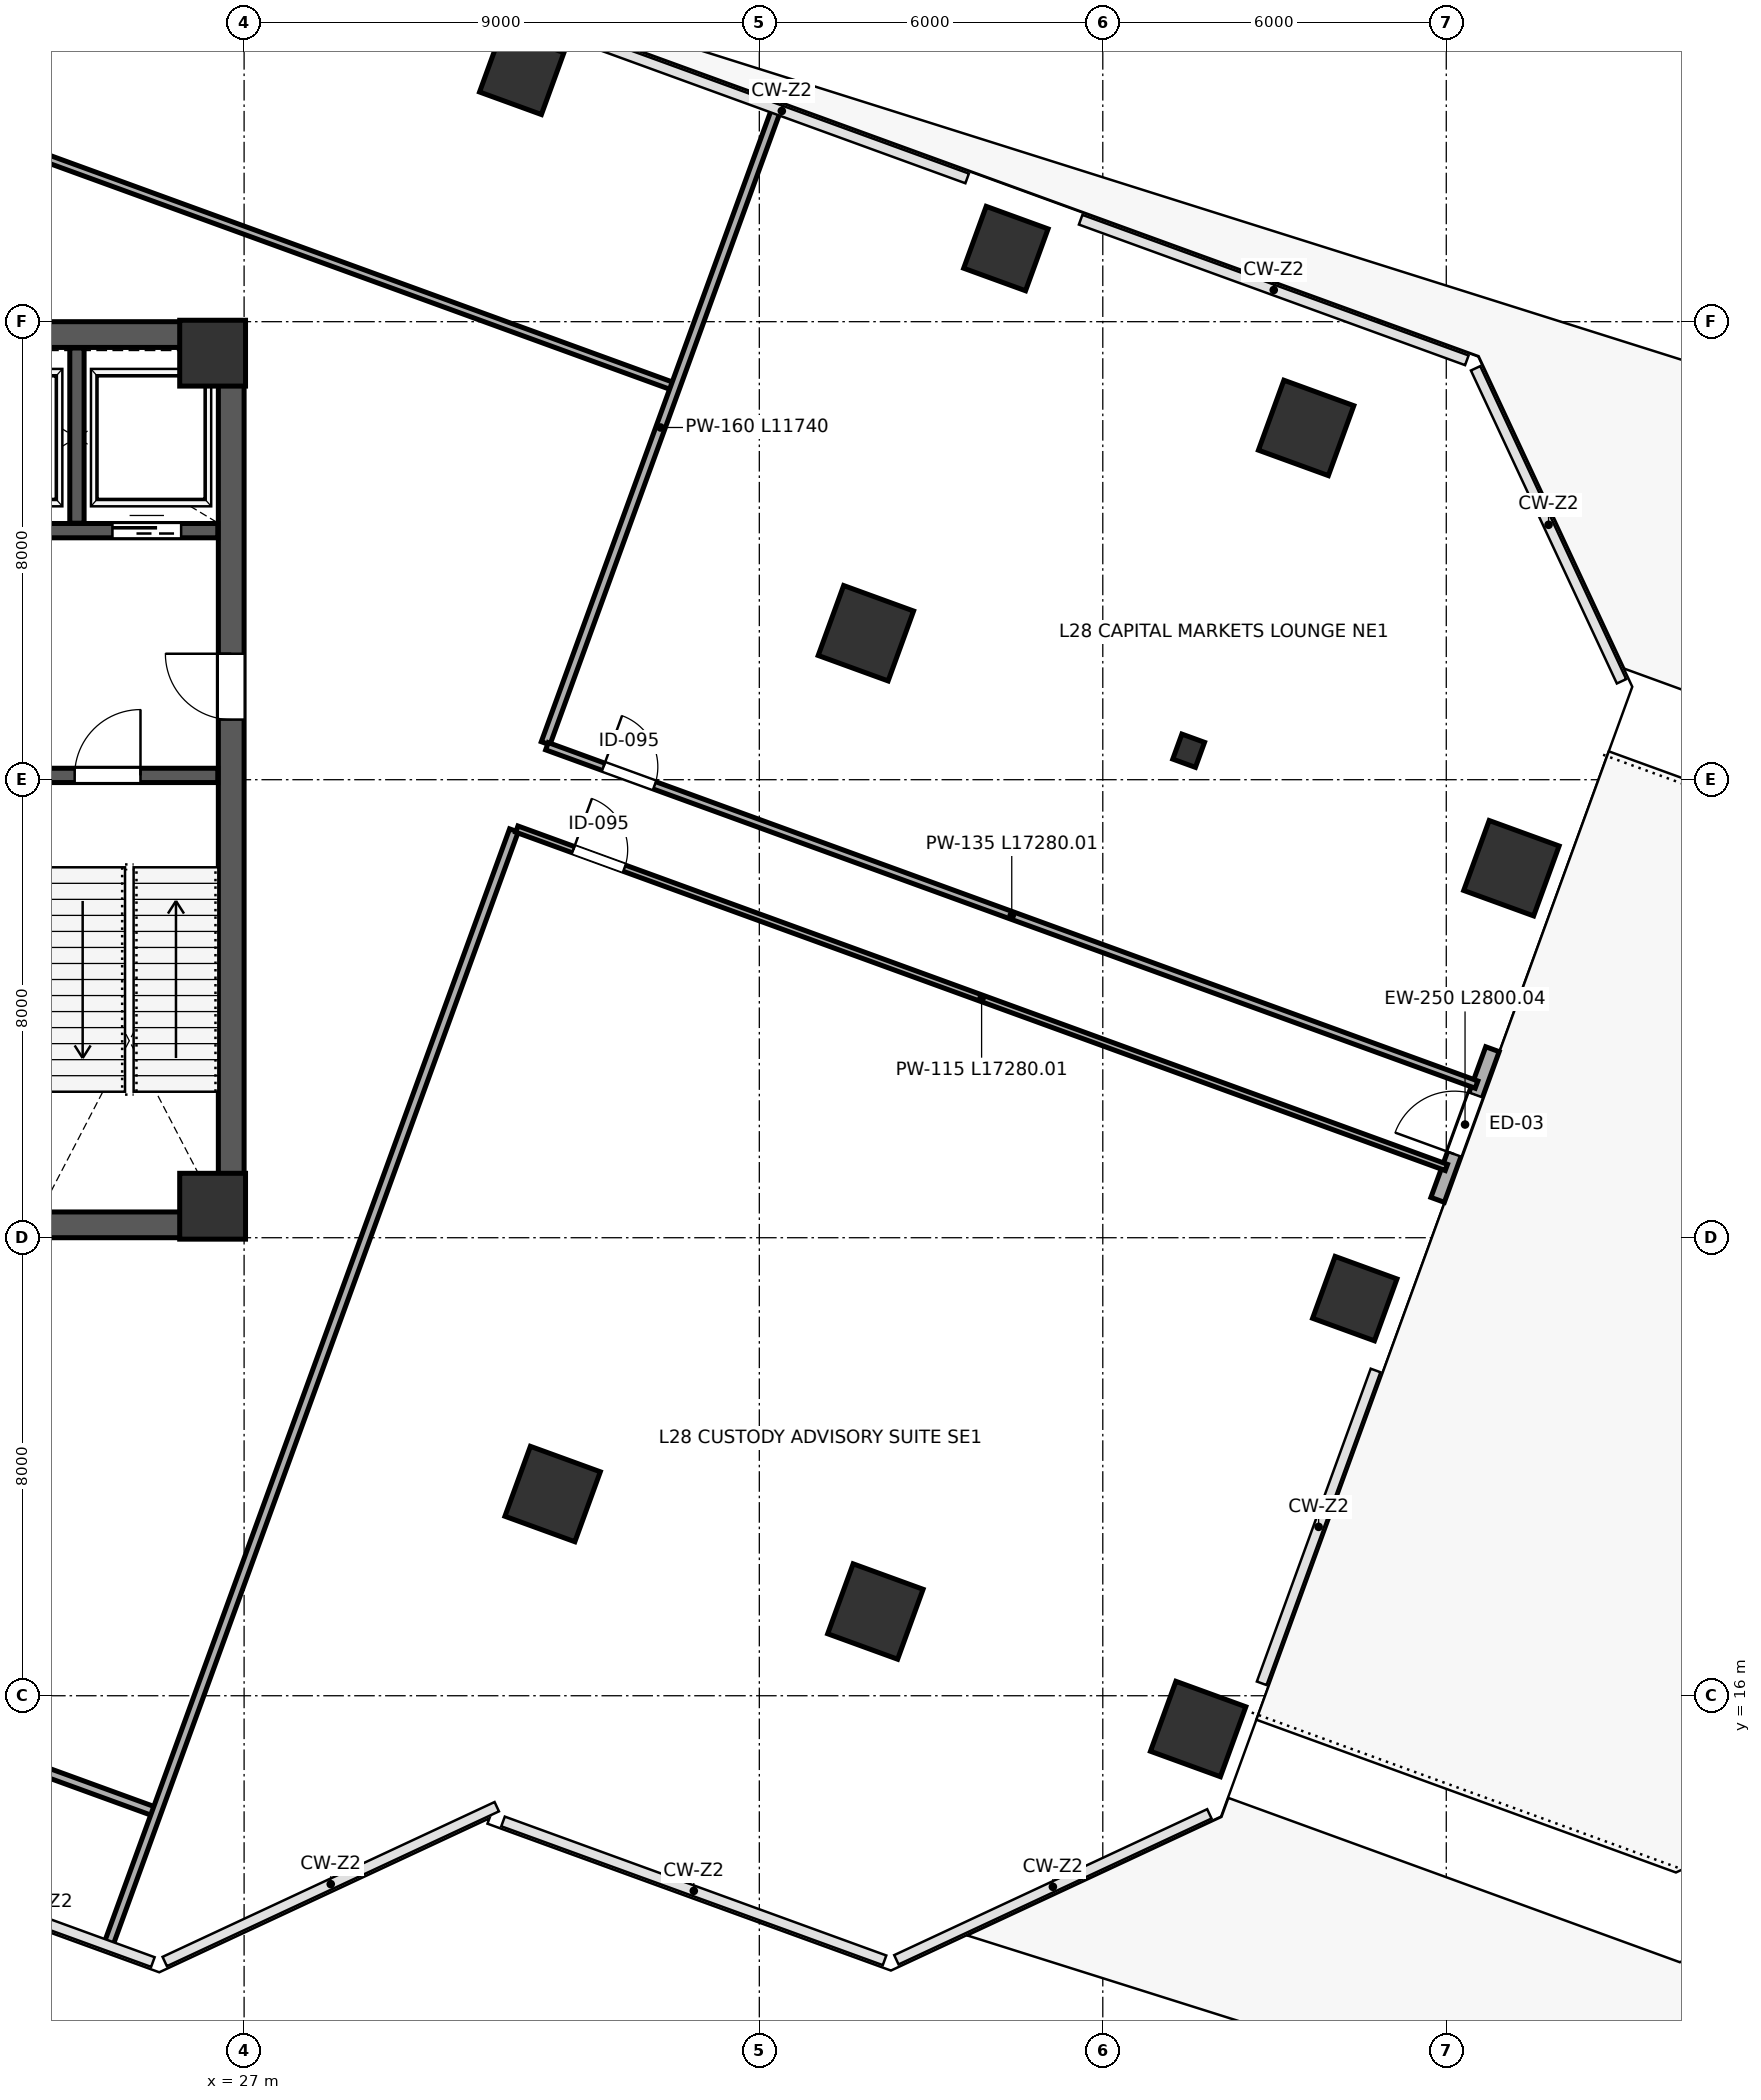
"""IFC4 building model, lengths in metres.
Left out: names, types, materials, properties, quantities, classifications, styles, units other than length and angle.
Written with IfcOpenShell. Run it as: python <this file> out.ifc"""

import sys

from ifc_helpers import new_model, si_unit, direction, frame, frame_2d, origin, origin_2d, place, context, subcontext, project, spatial, rectangle, i_section, extrude, source, transform, mapped, element, fill, save


model = new_model("IFC4")
c1 = context("Model", 3, precision=1e-05, world=origin(), true_north=direction((0.0, 1.0)))
c2 = subcontext(c1, "Body", "Model", "MODEL_VIEW")
j1 = project(units=[si_unit("LENGTHUNIT", "METRE"), si_unit("PLANEANGLEUNIT", "RADIAN")], contexts=[c1])
p1 = place(None, origin())
s1 = spatial("IfcSite", under=j1, at=p1, CompositionType="ELEMENT")
p2 = place(p1, origin())
s2 = spatial("IfcBuilding", under=s1, at=p2, CompositionType="ELEMENT")
p3 = place(p2, frame((0.0, 0.0, 127.6)))
s3 = spatial("IfcBuildingStorey", under=s2, at=p3, CompositionType="ELEMENT", Elevation=127.6)
m1 = source(origin(), c2, "Body", "SweptSolid", [
    extrude(rectangle(XDim=1.15, YDim=1.15, at=origin_2d()), origin(), (0.0, 0.0, 1.0), 5.398),
])
for number, where, z_axis, x_axis in (
    (1, (26.45, 24.55, 0.001), (0.0, 0.0, 1.0), (1.0, 0.0, 0.0)),
    (2, (26.45, 39.45, 0.001), (0.0, 0.0, 1.0), (1.0, 0.0, 0.0)),
):
    element("IfcColumn", number, at=place(p3, frame(where, z_axis=z_axis, x_axis=x_axis)), inside=s3, PredefinedType="COLUMN", context=c2, shape_type="MappedRepresentation", body=[
        mapped(m1, transform((0.0, 0.0, 0.0), scale=1.0)),
    ])
m2 = source(origin(), c2, "Body", "SweptSolid", [
    extrude(rectangle(XDim=1.15, YDim=1.15, at=origin_2d()), origin(), (0.0, 0.0, 1.0), 5.398),
])
p4 = place(p3, frame((31.85, 44.355, 0.001), z_axis=(0.0, 0.0, 1.0), x_axis=(-0.939692620786, 0.342020143326, 0.0)))
e3 = element("IfcColumn", 3, at=p4, inside=s3, PredefinedType="COLUMN", context=c2, shape_type="MappedRepresentation", body=[
    mapped(m2, transform((0.0, 0.0, 0.0), scale=1.0)),
])
m3 = source(origin(), c2, "Body", "SweptSolid", [
    extrude(rectangle(XDim=1.3, YDim=1.3, at=origin_2d()), origin(), (0.0, 0.0, 1.0), 5.398),
])
for number, where, z_axis, x_axis in (
    (4, (32.389, 19.523, 0.001), (0.0, 0.0, 1.0), (-0.94, 0.342, 0.0)),
    (5, (37.862, 34.558, 0.001), (0.0, 0.0, 1.0), (-0.94, 0.342, 0.0)),
):
    element("IfcColumn", number, at=place(p3, frame(where, z_axis=z_axis, x_axis=x_axis)), inside=s3, PredefinedType="COLUMN", context=c2, shape_type="MappedRepresentation", body=[
        mapped(m3, transform((0.0, 0.0, 0.0), scale=1.0)),
    ])
p5 = place(p3, frame((40.307, 41.277, 0.001), z_axis=(0.0, 0.0, 1.0), x_axis=(-0.939692620786, 0.342020143326, 0.0)))
e6 = element("IfcColumn", 6, at=p5, inside=s3, PredefinedType="COLUMN", context=c2, shape_type="MappedRepresentation", body=[
    mapped(m2, transform((0.0, 0.0, 0.0), scale=1.0)),
])
p6 = place(p3, frame((38.028, 17.471, 0.001), z_axis=(0.0, 0.0, 1.0), x_axis=(-0.939692620786, 0.342020143326, 0.0)))
e7 = element("IfcColumn", 7, at=p6, inside=s3, PredefinedType="COLUMN", context=c2, shape_type="MappedRepresentation", body=[
    mapped(m3, transform((0.0, 0.0, 0.0), scale=1.0)),
])
m4 = source(origin(), c2, "Body", "SweptSolid", [
    extrude(i_section(OverallWidth=0.421, OverallDepth=0.465, WebThickness=0.045, FlangeThickness=0.072, FilletRadius=0.015, at=origin_2d()), origin(), (0.0, 0.0, 1.0), 5.398),
])
p7 = place(p3, frame((43.5, 32.506, 0.001), z_axis=(0.0, 0.0, 1.0), x_axis=(-0.939692620786, 0.342020143326, 0.0)))
e8 = element("IfcColumn", 8, at=p7, inside=s3, PredefinedType="COLUMN", context=c2, shape_type="MappedRepresentation", body=[
    mapped(m4, transform((0.0, 0.0, 0.0), scale=1.0)),
])
p8 = place(p3, frame((45.552, 38.144, 0.001), z_axis=(0.0, 0.0, 1.0), x_axis=(-0.939692620786, 0.342020143326, 0.0)))
e9 = element("IfcColumn", 9, at=p8, inside=s3, PredefinedType="COLUMN", context=c2, shape_type="MappedRepresentation", body=[
    mapped(m3, transform((0.0, 0.0, 0.0), scale=1.0)),
])
m5 = source(origin(), c2, "Body", "SweptSolid", [
    extrude(rectangle(XDim=1.3, YDim=1.3, at=origin_2d()), origin(), (0.0, 0.0, 1.0), 5.398),
])
p9 = place(p3, frame((43.666, 15.419, 0.001), z_axis=(0.0, 0.0, 1.0), x_axis=(-0.939692620786, 0.342020143326, 0.0)))
e10 = element("IfcColumn", 10, at=p9, inside=s3, PredefinedType="COLUMN", context=c2, shape_type="MappedRepresentation", body=[
    mapped(m5, transform((0.0, 0.0, 0.0), scale=1.0)),
])
p10 = place(p3, frame((46.402, 22.937, 0.001), z_axis=(0.0, 0.0, 1.0), x_axis=(-0.939692620786, 0.342020143326, 0.0)))
e11 = element("IfcColumn", 11, at=p10, inside=s3, PredefinedType="COLUMN", context=c2, shape_type="MappedRepresentation", body=[
    mapped(m2, transform((0.0, 0.0, 0.0), scale=1.0)),
])
p11 = place(p3, frame((49.138, 30.454, 0.001), z_axis=(0.0, 0.0, 1.0), x_axis=(-0.939692620786, 0.342020143326, 0.0)))
e12 = element("IfcColumn", 12, at=p11, inside=s3, PredefinedType="COLUMN", context=c2, shape_type="MappedRepresentation", body=[
    mapped(m5, transform((0.0, 0.0, 0.0), scale=1.0)),
])
p12 = place(p3, frame((47.849, 24.661, 0.0), z_axis=(0.0, 0.0, 1.0), x_axis=(0.341981089711, 0.93970683422, 0.0)))
e13 = element("IfcWall", 13, at=p12, inside=s3, PredefinedType="SOLIDWALL", context=c2, shape_type="SweptSolid", body=[
    extrude(rectangle(XDim=2.8, YDim=0.25, at=frame_2d((1.4, 0.0))), origin(), (0.0, 0.0, 1.0), 5.16),
])
p13 = place(p12, frame((0.85, 0.0, 0.0)))
e14 = element("IfcOpeningElement", 14, at=p13, cuts=e13, PredefinedType="OPENING", context=c2, shape_type="SweptSolid", body=[
    extrude(rectangle(XDim=1.1, YDim=2.2, at=frame_2d((0.55, 1.1))), frame((0.0, 0.135, 0.0), z_axis=(0.0, -1.0, 0.0), x_axis=(1.0, 0.0, 0.0)), (0.0, 0.0, 1.0), 0.27),
])
p14 = place(p3, frame((26.775, 24.45, 0.0), z_axis=(0.0, 0.0, 1.0), x_axis=(0.0, 1.0, 0.0)))
e15 = element("IfcWall", 15, at=p14, inside=s3, PredefinedType="SHEAR", context=c2, shape_type="SweptSolid", body=[
    extrude(rectangle(XDim=15.1, YDim=0.45, at=frame_2d((7.55, 0.0))), origin(), (0.0, 0.0, 1.0), 5.16),
])
p15 = place(p14, frame((8.6, 0.0, 0.0)))
e16 = element("IfcOpeningElement", 16, at=p15, cuts=e15, PredefinedType="OPENING", context=c2, shape_type="SweptSolid", body=[
    extrude(rectangle(XDim=1.15, YDim=2.2, at=frame_2d((0.575, 1.1))), frame((0.0, 0.235, 0.0), z_axis=(0.0, -1.0, 0.0), x_axis=(1.0, 0.0, 0.0)), (0.0, 0.0, 1.0), 0.47),
])
for number, where, z_axis, x_axis in (
    (17, (9.0, 24.225, 0.0), (0.0, 0.0, 1.0), (1.0, 0.0, 0.0)),
    (18, (9.0, 39.775, 0.0), (0.0, 0.0, 1.0), (1.0, 0.0, 0.0)),
):
    element("IfcWall", number, at=place(p3, frame(where, z_axis=z_axis, x_axis=x_axis)), inside=s3, PredefinedType="SHEAR", context=c2, shape_type="SweptSolid", body=[
        extrude(rectangle(XDim=18.0, YDim=0.45, at=frame_2d((9.0, 0.0))), origin(), (0.0, 0.0, 1.0), 5.16),
    ])
p16 = place(p3, frame((23.19, 32.075, 0.0), z_axis=(0.0, 0.0, 1.0), x_axis=(1.0, 0.0, 0.0)))
e19 = element("IfcWall", 19, at=p16, inside=s3, PredefinedType="SHEAR", context=c2, shape_type="SweptSolid", body=[
    extrude(rectangle(XDim=3.35, YDim=0.25, at=frame_2d((1.675, 0.0))), origin(), (0.0, 0.0, 1.0), 5.16),
])
p17 = place(p16, frame((0.85, 0.0, 0.0)))
e20 = element("IfcOpeningElement", 20, at=p17, cuts=e19, PredefinedType="OPENING", context=c2, shape_type="SweptSolid", body=[
    extrude(rectangle(XDim=1.15, YDim=2.2, at=frame_2d((0.575, 1.1))), frame((0.0, 0.135, 0.0), z_axis=(0.0, -1.0, 0.0), x_axis=(1.0, 0.0, 0.0)), (0.0, 0.0, 1.0), 0.27),
])
p18 = place(p3, frame((21.45, 36.35, 0.0), z_axis=(0.0, 0.0, 1.0), x_axis=(1.0, 0.0, 0.0)))
e21 = element("IfcWall", 21, at=p18, inside=s3, PredefinedType="SHEAR", context=c2, shape_type="SweptSolid", body=[
    extrude(rectangle(XDim=5.09, YDim=0.25, at=frame_2d((2.545, 0.0))), origin(), (0.0, 0.0, 1.0), 5.16),
])
p19 = place(p18, frame((0.7, 0.0, 0.0)))
e22 = element("IfcOpeningElement", 22, at=p19, cuts=e21, PredefinedType="OPENING", context=c2, shape_type="SweptSolid", body=[
    extrude(rectangle(XDim=1.2, YDim=2.2, at=frame_2d((0.6, 1.1))), frame((0.0, 0.135, 0.0), z_axis=(0.0, -1.0, 0.0), x_axis=(1.0, 0.0, 0.0)), (0.0, 0.0, 1.0), 0.27),
])
p20 = place(p18, frame((3.25, 0.0, 0.0)))
e23 = element("IfcOpeningElement", 23, at=p20, cuts=e21, PredefinedType="OPENING", context=c2, shape_type="SweptSolid", body=[
    extrude(rectangle(XDim=1.2, YDim=2.2, at=frame_2d((0.6, 1.1))), frame((0.0, 0.135, 0.0), z_axis=(0.0, -1.0, 0.0), x_axis=(1.0, 0.0, 0.0)), (0.0, 0.0, 1.0), 0.27),
])
p21 = place(p3, frame((24.08, 36.48, 0.0), z_axis=(0.0, 0.0, 1.0), x_axis=(0.0, 1.0, 0.0)))
e24 = element("IfcWall", 24, at=p21, inside=s3, PredefinedType="SHEAR", context=c2, shape_type="SweptSolid", body=[
    extrude(rectangle(XDim=3.06, YDim=0.25, at=frame_2d((1.53, 0.0))), origin(), (0.0, 0.0, 1.0), 5.16),
])
p22 = place(p3, frame((7.419, 20.534, 0.0), z_axis=(0.0, 0.0, 1.0), x_axis=(0.939690753226, -0.34202527436, 0.0)))
e25 = element("IfcWall", 25, at=p22, inside=s3, PredefinedType="PARTITIONING", context=c2, shape_type="SweptSolid", body=[
    extrude(rectangle(XDim=19.17, YDim=0.16, at=frame_2d((9.585, 0.0))), origin(), (0.0, 0.0, 1.0), 5.16),
])
p23 = place(p22, frame((1.45, 0.0, 0.0)))
e26 = element("IfcOpeningElement", 26, at=p23, cuts=e25, PredefinedType="OPENING", context=c2, shape_type="SweptSolid", body=[
    extrude(rectangle(XDim=0.95, YDim=2.15, at=frame_2d((0.475, 1.075))), frame((0.0, 0.09, 0.0), z_axis=(0.0, -1.0, 0.0), x_axis=(1.0, 0.0, 0.0)), (0.0, 0.0, 1.0), 0.18),
])
p24 = place(p3, frame((9.432, 47.992, 0.0), z_axis=(0.0, 0.0, 1.0), x_axis=(0.939693422468, -0.342017940715, 0.0)))
e27 = element("IfcWall", 27, at=p24, inside=s3, PredefinedType="PARTITIONING", context=c2, shape_type="SweptSolid", body=[
    extrude(rectangle(XDim=26.67, YDim=0.135, at=frame_2d((13.335, 0.0))), origin(), (0.0, 0.0, 1.0), 5.16),
])
p25 = place(p24, frame((1.05, 0.0, 0.0)))
e28 = element("IfcOpeningElement", 28, at=p25, cuts=e27, PredefinedType="OPENING", context=c2, shape_type="SweptSolid", body=[
    extrude(rectangle(XDim=0.95, YDim=2.15, at=frame_2d((0.475, 1.075))), frame((0.0, 0.078, 0.0), z_axis=(0.0, -1.0, 0.0), x_axis=(1.0, 0.0, 0.0)), (0.0, 0.0, 1.0), 0.155),
])
p26 = place(p3, frame((32.267, 32.636, 0.0), z_axis=(0.0, 0.0, 1.0), x_axis=(0.34200686721, 0.939697452791, 0.0)))
e29 = element("IfcWall", 29, at=p26, inside=s3, PredefinedType="PARTITIONING", context=c2, shape_type="SweptSolid", body=[
    extrude(rectangle(XDim=11.74, YDim=0.16, at=frame_2d((5.87, 0.0))), origin(), (0.0, 0.0, 1.0), 4.395),
])
p27 = place(p3, frame((24.64, 11.681, 0.0), z_axis=(0.0, 0.0, 1.0), x_axis=(0.342014151498, 0.939694801611, 0.0)))
e30 = element("IfcWall", 30, at=p27, inside=s3, PredefinedType="PARTITIONING", context=c2, shape_type="SweptSolid", body=[
    extrude(rectangle(XDim=20.68, YDim=0.16, at=frame_2d((10.34, 0.0))), origin(), (0.0, 0.0, 1.0), 5.16),
])
p28 = place(p3, frame((32.291, 32.585, 0.0), z_axis=(0.0, 0.0, 1.0), x_axis=(0.939691078169, -0.342024381601, 0.0)))
e31 = element("IfcWall", 31, at=p28, inside=s3, PredefinedType="PARTITIONING", context=c2, shape_type="SweptSolid", body=[
    extrude(rectangle(XDim=17.28, YDim=0.135, at=frame_2d((8.64, 0.0))), origin(), (0.0, 0.0, 1.0), 4.395),
])
p29 = place(p28, frame((1.05, 0.0, 0.0)))
e32 = element("IfcOpeningElement", 32, at=p29, cuts=e31, PredefinedType="OPENING", context=c2, shape_type="SweptSolid", body=[
    extrude(rectangle(XDim=0.95, YDim=2.15, at=frame_2d((0.475, 1.075))), frame((0.0, 0.078, 0.0), z_axis=(0.0, -1.0, 0.0), x_axis=(1.0, 0.0, 0.0)), (0.0, 0.0, 1.0), 0.155),
])
p30 = place(p3, frame((31.764, 31.137, 0.0), z_axis=(0.0, 0.0, 1.0), x_axis=(0.939692730905, -0.342019840775, 0.0)))
e33 = element("IfcWall", 33, at=p30, inside=s3, PredefinedType="PARTITIONING", context=c2, shape_type="SweptSolid", body=[
    extrude(rectangle(XDim=17.28, YDim=0.115, at=frame_2d((8.64, 0.0))), origin(), (0.0, 0.0, 1.0), 4.395),
])
p31 = place(p30, frame((1.05, 0.0, 0.0)))
e34 = element("IfcOpeningElement", 34, at=p31, cuts=e33, PredefinedType="OPENING", context=c2, shape_type="SweptSolid", body=[
    extrude(rectangle(XDim=0.95, YDim=2.15, at=frame_2d((0.475, 1.075))), frame((0.0, 0.067, 0.0), z_axis=(0.0, -1.0, 0.0), x_axis=(1.0, 0.0, 0.0)), (0.0, 0.0, 1.0), 0.135),
])
m6 = source(origin(), c2, "Body", "SweptSolid", [
    extrude(rectangle(XDim=1.1, YDim=2.2, at=frame_2d((0.55, 1.1))), frame((0.0, 0.025, 0.0), z_axis=(0.0, -1.0, 0.0), x_axis=(1.0, 0.0, 0.0)), (0.0, 0.0, 1.0), 0.05),
])
p32 = place(p13, origin())
e35 = element("IfcDoor", 35, at=p32, inside=s3, OperationType="SINGLE_SWING_LEFT", PredefinedType="DOOR", context=c2, shape_type="MappedRepresentation", body=[
    mapped(m6, transform((0.0, 0.0, 0.0), scale=1.0)),
])
fill(e14, e35)
m7 = source(origin(), c2, "Body", "SweptSolid", [
    extrude(rectangle(XDim=1.15, YDim=2.2, at=frame_2d((0.575, 1.1))), frame((0.0, 0.025, 0.0), z_axis=(0.0, -1.0, 0.0), x_axis=(1.0, 0.0, 0.0)), (0.0, 0.0, 1.0), 0.05),
])
p33 = place(p17, origin())
e36 = element("IfcDoor", 36, at=p33, inside=s3, OperationType="SINGLE_SWING_RIGHT", PredefinedType="DOOR", context=c2, shape_type="MappedRepresentation", body=[
    mapped(m7, transform((0.0, 0.0, 0.0), scale=1.0)),
])
fill(e20, e36)
m8 = source(origin(), c2, "Body", "SweptSolid", [
    extrude(rectangle(XDim=1.15, YDim=2.2, at=frame_2d((0.575, 1.1))), frame((0.0, 0.025, 0.0), z_axis=(0.0, -1.0, 0.0), x_axis=(1.0, 0.0, 0.0)), (0.0, 0.0, 1.0), 0.05),
])
p34 = place(p15, origin())
e37 = element("IfcDoor", 37, at=p34, inside=s3, OperationType="SINGLE_SWING_RIGHT", PredefinedType="DOOR", context=c2, shape_type="MappedRepresentation", body=[
    mapped(m8, transform((0.0, 0.0, 0.0), scale=1.0)),
])
fill(e16, e37)
m9 = source(origin(), c2, "Body", "SweptSolid", [
    extrude(rectangle(XDim=1.2, YDim=2.2, at=frame_2d((0.6, 1.1))), frame((0.0, 0.025, 0.0), z_axis=(0.0, -1.0, 0.0), x_axis=(1.0, 0.0, 0.0)), (0.0, 0.0, 1.0), 0.05),
])
p35 = place(p20, origin())
e38 = element("IfcDoor", 38, at=p35, inside=s3, OperationType="SLIDING_TO_RIGHT", PredefinedType="DOOR", context=c2, shape_type="MappedRepresentation", body=[
    mapped(m9, transform((0.0, 0.0, 0.0), scale=1.0)),
])
fill(e23, e38)
m10 = source(origin(), c2, "Body", "SweptSolid", [
    extrude(rectangle(XDim=0.95, YDim=2.15, at=frame_2d((0.475, 1.075))), frame((0.0, 0.025, 0.0), z_axis=(0.0, -1.0, 0.0), x_axis=(1.0, 0.0, 0.0)), (0.0, 0.0, 1.0), 0.05),
])
p36 = place(p29, origin())
e39 = element("IfcDoor", 39, at=p36, inside=s3, OperationType="SINGLE_SWING_LEFT", PredefinedType="DOOR", context=c2, shape_type="MappedRepresentation", body=[
    mapped(m10, transform((0.0, 0.0, 0.0), scale=1.0)),
])
fill(e32, e39)
p37 = place(p31, origin())
e40 = element("IfcDoor", 40, at=p37, inside=s3, OperationType="SINGLE_SWING_LEFT", PredefinedType="DOOR", context=c2, shape_type="MappedRepresentation", body=[
    mapped(m10, transform((0.0, 0.0, 0.0), scale=1.0)),
])
fill(e34, e40)
save(model, sys.argv[1])
